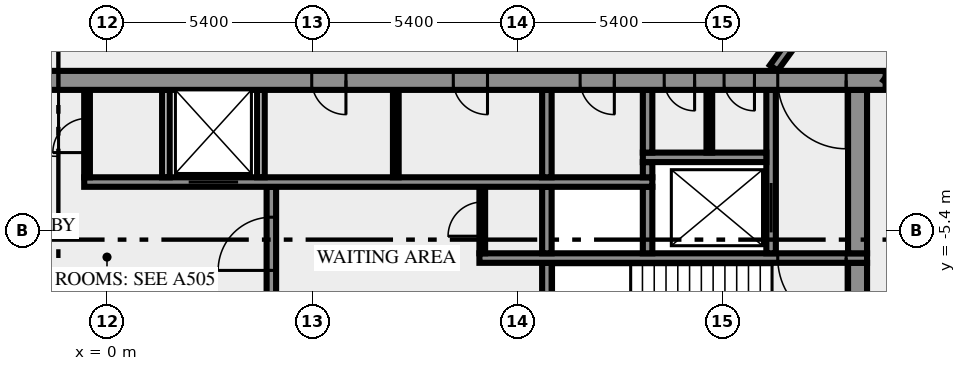
"""IFC4 building model, lengths in metres.
Left out: names, types, materials, properties, quantities, classifications, styles, units other than length and angle.
Written with IfcOpenShell. Run it as: python <this file> out.ifc"""

import sys

from ifc_helpers import new_model, si_unit, direction, frame, frame_2d, origin, place, context, subcontext, project, spatial, rectangle, extrude, element, fill, save


model = new_model("IFC4")
c1 = context("Model", 3, precision=1e-05, world=origin(), true_north=direction((0.0, 1.0)))
c2 = subcontext(c1, "Body", "Model", "MODEL_VIEW")
j1 = project(units=[si_unit("LENGTHUNIT", "METRE"), si_unit("PLANEANGLEUNIT", "RADIAN")], contexts=[c1])
p1 = place(None, origin())
s1 = spatial("IfcSite", under=j1, at=p1, CompositionType="ELEMENT")
p2 = place(p1, origin())
s2 = spatial("IfcBuilding", under=s1, at=p2, CompositionType="ELEMENT")
p3 = place(p2, frame((0.0, 0.0, 253.0)))
s3 = spatial("IfcBuildingStorey", under=s2, at=p3, CompositionType="ELEMENT", Elevation=253.0)
p4 = place(p3, frame((19.75, -10.5, 0.0), z_axis=(0.0, 0.0, 1.0), x_axis=(0.0, 1.0, 0.0)))
e1 = element("IfcWall", 1, at=p4, inside=s3, PredefinedType="SHEAR", context=c2, shape_type="SweptSolid", body=[
    extrude(rectangle(XDim=4.25, YDim=0.5, at=frame_2d((2.125, 0.0))), origin(), (0.0, 0.0, 1.0), 3.65),
])
p5 = place(p3, frame((4.325, -7.25, 0.0), z_axis=(0.0, 0.0, 1.0), x_axis=(0.0, 1.0, 0.0)))
e2 = element("IfcWall", 2, at=p5, inside=s3, PredefinedType="SHEAR", context=c2, shape_type="SweptSolid", body=[
    extrude(rectangle(XDim=3.0, YDim=0.25, at=frame_2d((1.5, 0.0))), origin(), (0.0, 0.0, 1.0), 3.65),
])
p6 = place(p5, frame((0.8, 0.0, 0.0)))
e3 = element("IfcOpeningElement", 3, at=p6, cuts=e2, PredefinedType="OPENING", context=c2, shape_type="SweptSolid", body=[
    extrude(rectangle(XDim=1.4, YDim=2.1, at=frame_2d((0.7, 1.05))), frame((0.0, 0.135, 0.0), z_axis=(0.0, -1.0, 0.0), x_axis=(1.0, 0.0, 0.0)), (0.0, 0.0, 1.0), 0.27),
])
p7 = place(p3, frame((11.575, -7.25, 0.0), z_axis=(0.0, 0.0, 1.0), x_axis=(0.0, 1.0, 0.0)))
e4 = element("IfcWall", 4, at=p7, inside=s3, PredefinedType="SHEAR", context=c2, shape_type="SweptSolid", body=[
    extrude(rectangle(XDim=1.0, YDim=0.25, at=frame_2d((0.5, 0.0))), origin(), (0.0, 0.0, 1.0), 3.65),
])
p8 = place(p3, frame((20.0, -6.125, 0.0), z_axis=(0.0, 0.0, 1.0), x_axis=(-1.0, 0.0, 0.0)))
e5 = element("IfcWall", 5, at=p8, inside=s3, PredefinedType="SHEAR", context=c2, shape_type="SweptSolid", body=[
    extrude(rectangle(XDim=10.2, YDim=0.25, at=frame_2d((5.1, 0.0))), origin(), (0.0, 0.0, 1.0), 3.65),
])
p9 = place(p8, frame((0.55, 0.0, 0.0)))
e6 = element("IfcOpeningElement", 6, at=p9, cuts=e5, PredefinedType="OPENING", context=c2, shape_type="SweptSolid", body=[
    extrude(rectangle(XDim=1.8, YDim=2.1, at=frame_2d((0.9, 1.05))), frame((0.0, 0.135, 0.0), z_axis=(0.0, -1.0, 0.0), x_axis=(1.0, 0.0, 0.0)), (0.0, 0.0, 1.0), 0.27),
])
p10 = place(p3, frame((9.875, -6.0, 0.0), z_axis=(0.0, 0.0, 1.0), x_axis=(0.0, 1.0, 0.0)))
e7 = element("IfcWall", 7, at=p10, inside=s3, PredefinedType="PARTITIONING", context=c2, shape_type="SweptSolid", body=[
    extrude(rectangle(XDim=1.75, YDim=0.15, at=frame_2d((0.875, 0.0))), origin(), (0.0, 0.0, 1.0), 3.65),
])
p11 = place(p10, frame((0.45, 0.0, 0.0)))
e8 = element("IfcOpeningElement", 8, at=p11, cuts=e7, PredefinedType="OPENING", context=c2, shape_type="SweptSolid", body=[
    extrude(rectangle(XDim=0.9, YDim=2.1, at=frame_2d((0.45, 1.05))), frame((0.0, 0.085, 0.0), z_axis=(0.0, -1.0, 0.0), x_axis=(1.0, 0.0, 0.0)), (0.0, 0.0, 1.0), 0.17),
])
for number, where, z_axis, x_axis in (
    (9, (11.575, -6.0, 0.0), (0.0, 0.0, 1.0), (0.0, 1.0, 0.0)),
    (10, (14.225, -6.0, 0.0), (0.0, 0.0, 1.0), (0.0, 1.0, 0.0)),
):
    element("IfcWall", number, at=place(p3, frame(where, z_axis=z_axis, x_axis=x_axis)), inside=s3, PredefinedType="SHEAR", context=c2, shape_type="SweptSolid", body=[
        extrude(rectangle(XDim=1.75, YDim=0.25, at=frame_2d((0.875, 0.0))), origin(), (0.0, 0.0, 1.0), 3.65),
    ])
p12 = place(p3, frame((17.475, -6.0, 0.0), z_axis=(0.0, 0.0, 1.0), x_axis=(0.0, 1.0, 0.0)))
e11 = element("IfcWall", 11, at=p12, inside=s3, PredefinedType="SHEAR", context=c2, shape_type="SweptSolid", body=[
    extrude(rectangle(XDim=4.3, YDim=0.25, at=frame_2d((2.15, 0.0))), origin(), (0.0, 0.0, 1.0), 3.65),
])
p13 = place(p12, frame((0.55, 0.0, 0.0)))
e12 = element("IfcOpeningElement", 12, at=p13, cuts=e11, PredefinedType="OPENING", context=c2, shape_type="SweptSolid", body=[
    extrude(rectangle(XDim=1.3, YDim=2.1, at=frame_2d((0.65, 1.05))), frame((0.0, 0.135, 0.0), z_axis=(0.0, -1.0, 0.0), x_axis=(1.0, 0.0, 0.0)), (0.0, 0.0, 1.0), 0.27),
])
p14 = place(p3, frame((19.75, -6.0, 0.0), z_axis=(0.0, 0.0, 1.0), x_axis=(0.0, 1.0, 0.0)))
e13 = element("IfcWall", 13, at=p14, inside=s3, PredefinedType="SHEAR", context=c2, shape_type="SweptSolid", body=[
    extrude(rectangle(XDim=4.3, YDim=0.5, at=frame_2d((2.15, 0.0))), origin(), (0.0, 0.0, 1.0), 3.65),
])
p15 = place(p3, frame((-0.6, -4.125, 0.0), z_axis=(0.0, 0.0, 1.0), x_axis=(1.0, 0.0, 0.0)))
e14 = element("IfcWall", 14, at=p15, inside=s3, PredefinedType="SHEAR", context=c2, shape_type="SweptSolid", body=[
    extrude(rectangle(XDim=14.95, YDim=0.25, at=frame_2d((7.475, 0.0))), origin(), (0.0, 0.0, 1.0), 3.65),
])
p16 = place(p15, frame((2.75, 0.0, 0.0)))
e15 = element("IfcOpeningElement", 15, at=p16, cuts=e14, PredefinedType="OPENING", context=c2, shape_type="SweptSolid", body=[
    extrude(rectangle(XDim=1.3, YDim=2.1, at=frame_2d((0.65, 1.05))), frame((0.0, 0.135, 0.0), z_axis=(0.0, -1.0, 0.0), x_axis=(1.0, 0.0, 0.0)), (0.0, 0.0, 1.0), 0.27),
])
p17 = place(p3, frame((-0.525, -4.0, 0.0), z_axis=(0.0, 0.0, 1.0), x_axis=(0.0, 1.0, 0.0)))
e16 = element("IfcWall", 16, at=p17, inside=s3, PredefinedType="PARTITIONING", context=c2, shape_type="SweptSolid", body=[
    extrude(rectangle(XDim=2.3, YDim=0.15, at=frame_2d((1.15, 0.0))), origin(), (0.0, 0.0, 1.0), 3.65),
])
p18 = place(p17, frame((0.65, 0.0, 0.0)))
e17 = element("IfcOpeningElement", 17, at=p18, cuts=e16, PredefinedType="OPENING", context=c2, shape_type="SweptSolid", body=[
    extrude(rectangle(XDim=0.9, YDim=2.1, at=frame_2d((0.45, 1.05))), frame((0.0, 0.085, 0.0), z_axis=(0.0, -1.0, 0.0), x_axis=(1.0, 0.0, 0.0)), (0.0, 0.0, 1.0), 0.17),
])
for number, where, z_axis, x_axis in (
    (18, (1.55, -4.0, 0.0), (0.0, 0.0, 1.0), (0.0, 1.0, 0.0)),
    (19, (4.05, -4.0, 0.0), (0.0, 0.0, 1.0), (0.0, 1.0, 0.0)),
):
    element("IfcWall", number, at=place(p3, frame(where, z_axis=z_axis, x_axis=x_axis)), inside=s3, PredefinedType="SOLIDWALL", context=c2, shape_type="SweptSolid", body=[
        extrude(rectangle(XDim=2.3, YDim=0.2, at=frame_2d((1.15, 0.0))), origin(), (0.0, 0.0, 1.0), 3.65),
    ])
p19 = place(p3, frame((7.6, -4.0, 0.0), z_axis=(0.0, 0.0, 1.0), x_axis=(0.0, 1.0, 0.0)))
e20 = element("IfcWall", 20, at=p19, inside=s3, PredefinedType="PARTITIONING", context=c2, shape_type="SweptSolid", body=[
    extrude(rectangle(XDim=2.3, YDim=0.15, at=frame_2d((1.15, 0.0))), origin(), (0.0, 0.0, 1.0), 3.65),
])
p20 = place(p3, frame((11.575, -4.0, 0.0), z_axis=(0.0, 0.0, 1.0), x_axis=(0.0, 1.0, 0.0)))
e21 = element("IfcWall", 21, at=p20, inside=s3, PredefinedType="SHEAR", context=c2, shape_type="SweptSolid", body=[
    extrude(rectangle(XDim=2.3, YDim=0.25, at=frame_2d((1.15, 0.0))), origin(), (0.0, 0.0, 1.0), 3.65),
])
p21 = place(p3, frame((14.225, -4.0, 0.0), z_axis=(0.0, 0.0, 1.0), x_axis=(0.0, 1.0, 0.0)))
e22 = element("IfcWall", 22, at=p21, inside=s3, PredefinedType="SHEAR", context=c2, shape_type="SweptSolid", body=[
    extrude(rectangle(XDim=0.4, YDim=0.25, at=frame_2d((0.2, 0.0))), origin(), (0.0, 0.0, 1.0), 3.65),
])
p22 = place(p3, frame((14.1, -3.475, 0.0), z_axis=(0.0, 0.0, 1.0), x_axis=(1.0, 0.0, 0.0)))
e23 = element("IfcWall", 23, at=p22, inside=s3, PredefinedType="SHEAR", context=c2, shape_type="SweptSolid", body=[
    extrude(rectangle(XDim=3.25, YDim=0.25, at=frame_2d((1.625, 0.0))), origin(), (0.0, 0.0, 1.0), 3.65),
])
p23 = place(p3, frame((14.225, -3.35, 0.0), z_axis=(0.0, 0.0, 1.0), x_axis=(0.0, 1.0, 0.0)))
e24 = element("IfcWall", 24, at=p23, inside=s3, PredefinedType="SHEAR", context=c2, shape_type="SweptSolid", body=[
    extrude(rectangle(XDim=1.65, YDim=0.25, at=frame_2d((0.825, 0.0))), origin(), (0.0, 0.0, 1.0), 3.65),
])
p24 = place(p3, frame((15.85, -3.35, 0.0), z_axis=(0.0, 0.0, 1.0), x_axis=(0.0, 1.0, 0.0)))
e25 = element("IfcWall", 25, at=p24, inside=s3, PredefinedType="PARTITIONING", context=c2, shape_type="SweptSolid", body=[
    extrude(rectangle(XDim=1.65, YDim=0.15, at=frame_2d((0.825, 0.0))), origin(), (0.0, 0.0, 1.0), 3.65),
])
p25 = place(p3, frame((20.49, -1.45, 0.0), z_axis=(0.0, 0.0, 1.0), x_axis=(-1.0, 0.0, 0.0)))
e26 = element("IfcWall", 26, at=p25, inside=s3, PredefinedType="SHEAR", context=c2, shape_type="SweptSolid", body=[
    extrude(rectangle(XDim=40.98, YDim=0.5, at=frame_2d((20.49, 0.0))), origin(), (0.0, 0.0, 1.0), 3.65),
])
p26 = place(p25, frame((38.14, 0.0, 0.0)))
e27 = element("IfcOpeningElement", 27, at=p26, cuts=e26, PredefinedType="OPENING", context=c2, shape_type="SweptSolid", body=[
    extrude(rectangle(XDim=1.8, YDim=2.1, at=frame_2d((0.9, 1.05))), frame((0.0, 0.26, 0.0), z_axis=(0.0, -1.0, 0.0), x_axis=(1.0, 0.0, 0.0)), (0.0, 0.0, 1.0), 0.52),
])
p27 = place(p25, frame((35.89, 0.0, 0.0)))
e28 = element("IfcOpeningElement", 28, at=p27, cuts=e26, PredefinedType="OPENING", context=c2, shape_type="SweptSolid", body=[
    extrude(rectangle(XDim=0.9, YDim=2.1, at=frame_2d((0.45, 1.05))), frame((0.0, 0.26, 0.0), z_axis=(0.0, -1.0, 0.0), x_axis=(1.0, 0.0, 0.0)), (0.0, 0.0, 1.0), 0.52),
])
p28 = place(p25, frame((32.94, 0.0, 0.0)))
e29 = element("IfcOpeningElement", 29, at=p28, cuts=e26, PredefinedType="OPENING", context=c2, shape_type="SweptSolid", body=[
    extrude(rectangle(XDim=0.9, YDim=2.1, at=frame_2d((0.45, 1.05))), frame((0.0, 0.26, 0.0), z_axis=(0.0, -1.0, 0.0), x_axis=(1.0, 0.0, 0.0)), (0.0, 0.0, 1.0), 0.52),
])
p29 = place(p25, frame((31.015, 0.0, 0.0)))
e30 = element("IfcOpeningElement", 30, at=p29, cuts=e26, PredefinedType="OPENING", context=c2, shape_type="SweptSolid", body=[
    extrude(rectangle(XDim=0.8, YDim=2.1, at=frame_2d((0.4, 1.05))), frame((0.0, 0.26, 0.0), z_axis=(0.0, -1.0, 0.0), x_axis=(1.0, 0.0, 0.0)), (0.0, 0.0, 1.0), 0.52),
])
p30 = place(p25, frame((24.765, 0.0, 0.0)))
e31 = element("IfcOpeningElement", 31, at=p30, cuts=e26, PredefinedType="OPENING", context=c2, shape_type="SweptSolid", body=[
    extrude(rectangle(XDim=0.8, YDim=2.1, at=frame_2d((0.4, 1.05))), frame((0.0, 0.26, 0.0), z_axis=(0.0, -1.0, 0.0), x_axis=(1.0, 0.0, 0.0)), (0.0, 0.0, 1.0), 0.52),
])
p31 = place(p25, frame((21.765, 0.0, 0.0)))
e32 = element("IfcOpeningElement", 32, at=p31, cuts=e26, PredefinedType="OPENING", context=c2, shape_type="SweptSolid", body=[
    extrude(rectangle(XDim=2.0, YDim=2.1, at=frame_2d((1.0, 1.05))), frame((0.0, 0.26, 0.0), z_axis=(0.0, -1.0, 0.0), x_axis=(1.0, 0.0, 0.0)), (0.0, 0.0, 1.0), 0.52),
])
p32 = place(p25, frame((14.202, 0.0, 0.0)))
e33 = element("IfcOpeningElement", 33, at=p32, cuts=e26, PredefinedType="OPENING", context=c2, shape_type="SweptSolid", body=[
    extrude(rectangle(XDim=0.9, YDim=2.1, at=frame_2d((0.45, 1.05))), frame((0.0, 0.26, 0.0), z_axis=(0.0, -1.0, 0.0), x_axis=(1.0, 0.0, 0.0)), (0.0, 0.0, 1.0), 0.52),
])
p33 = place(p25, frame((10.478, 0.0, 0.0)))
e34 = element("IfcOpeningElement", 34, at=p33, cuts=e26, PredefinedType="OPENING", context=c2, shape_type="SweptSolid", body=[
    extrude(rectangle(XDim=0.9, YDim=2.1, at=frame_2d((0.45, 1.05))), frame((0.0, 0.26, 0.0), z_axis=(0.0, -1.0, 0.0), x_axis=(1.0, 0.0, 0.0)), (0.0, 0.0, 1.0), 0.52),
])
p34 = place(p25, frame((7.14, 0.0, 0.0)))
e35 = element("IfcOpeningElement", 35, at=p34, cuts=e26, PredefinedType="OPENING", context=c2, shape_type="SweptSolid", body=[
    extrude(rectangle(XDim=0.9, YDim=2.1, at=frame_2d((0.45, 1.05))), frame((0.0, 0.26, 0.0), z_axis=(0.0, -1.0, 0.0), x_axis=(1.0, 0.0, 0.0)), (0.0, 0.0, 1.0), 0.52),
])
p35 = place(p25, frame((5.028, 0.0, 0.0)))
e36 = element("IfcOpeningElement", 36, at=p35, cuts=e26, PredefinedType="OPENING", context=c2, shape_type="SweptSolid", body=[
    extrude(rectangle(XDim=0.8, YDim=2.1, at=frame_2d((0.4, 1.05))), frame((0.0, 0.26, 0.0), z_axis=(0.0, -1.0, 0.0), x_axis=(1.0, 0.0, 0.0)), (0.0, 0.0, 1.0), 0.52),
])
p36 = place(p25, frame((3.452, 0.0, 0.0)))
e37 = element("IfcOpeningElement", 37, at=p36, cuts=e26, PredefinedType="OPENING", context=c2, shape_type="SweptSolid", body=[
    extrude(rectangle(XDim=0.8, YDim=2.1, at=frame_2d((0.4, 1.05))), frame((0.0, 0.26, 0.0), z_axis=(0.0, -1.0, 0.0), x_axis=(1.0, 0.0, 0.0)), (0.0, 0.0, 1.0), 0.52),
])
p37 = place(p25, frame((1.04, 0.0, 0.0)))
e38 = element("IfcOpeningElement", 38, at=p37, cuts=e26, PredefinedType="OPENING", context=c2, shape_type="SweptSolid", body=[
    extrude(rectangle(XDim=1.8, YDim=2.1, at=frame_2d((0.9, 1.05))), frame((0.0, 0.26, 0.0), z_axis=(0.0, -1.0, 0.0), x_axis=(1.0, 0.0, 0.0)), (0.0, 0.0, 1.0), 0.52),
])
p38 = place(p3, frame((17.545, -1.125, 0.0), z_axis=(0.0, 0.0, 1.0), x_axis=(0.587796810203, 0.809008596935, 0.0)))
e39 = element("IfcWall", 39, at=p38, inside=s3, PredefinedType="SOLIDWALL", context=c2, shape_type="SweptSolid", body=[
    extrude(rectangle(XDim=12.703, YDim=0.25, at=frame_2d((6.352, 0.0))), origin(), (0.0, 0.0, 1.0), 3.65),
])
p39 = place(p38, frame((3.441, 0.0, 0.0)))
e40 = element("IfcOpeningElement", 40, at=p39, cuts=e39, PredefinedType="OPENING", context=c2, shape_type="SweptSolid", body=[
    extrude(rectangle(XDim=0.9, YDim=2.1, at=frame_2d((0.45, 1.05))), frame((0.0, 0.135, 0.0), z_axis=(0.0, -1.0, 0.0), x_axis=(1.0, 0.0, 0.0)), (0.0, 0.0, 1.0), 0.27),
])
p40 = place(p3, frame((27.009, 7.392, 0.0), z_axis=(0.0, 0.0, 1.0), x_axis=(-0.587776457057, -0.809023384414, 0.0)))
e41 = element("IfcWall", 41, at=p40, inside=s3, PredefinedType="SOLIDWALL", context=c2, shape_type="SweptSolid", body=[
    extrude(rectangle(XDim=11.021, YDim=0.25, at=frame_2d((5.51, 0.0))), origin(), (0.0, 0.0, 1.0), 3.65),
])
p41 = place(p40, frame((0.225, 0.0, 0.0)))
e42 = element("IfcOpeningElement", 42, at=p41, cuts=e41, PredefinedType="OPENING", context=c2, shape_type="SweptSolid", body=[
    extrude(rectangle(XDim=0.9, YDim=2.1, at=frame_2d((0.45, 1.05))), frame((0.0, 0.135, 0.0), z_axis=(0.0, -1.0, 0.0), x_axis=(1.0, 0.0, 0.0)), (0.0, 0.0, 1.0), 0.27),
])
p42 = place(p6, origin())
e43 = element("IfcDoor", 43, at=p42, inside=s3, OperationType="DOUBLE_DOOR_SINGLE_SWING", PredefinedType="DOOR", context=c2, shape_type="SweptSolid", body=[
    extrude(rectangle(XDim=1.4, YDim=2.1, at=frame_2d((0.7, 1.05))), frame((0.0, 0.025, 0.0), z_axis=(0.0, -1.0, 0.0), x_axis=(1.0, 0.0, 0.0)), (0.0, 0.0, 1.0), 0.05),
])
fill(e3, e43)
p43 = place(p9, origin())
e44 = element("IfcDoor", 44, at=p43, inside=s3, OperationType="DOUBLE_DOOR_SINGLE_SWING", PredefinedType="DOOR", context=c2, shape_type="SweptSolid", body=[
    extrude(rectangle(XDim=1.8, YDim=2.1, at=frame_2d((0.9, 1.05))), frame((0.0, 0.025, 0.0), z_axis=(0.0, -1.0, 0.0), x_axis=(1.0, 0.0, 0.0)), (0.0, 0.0, 1.0), 0.05),
])
fill(e6, e44)
p44 = place(p11, origin())
e45 = element("IfcDoor", 45, at=p44, inside=s3, OperationType="SINGLE_SWING_RIGHT", PredefinedType="DOOR", context=c2, shape_type="SweptSolid", body=[
    extrude(rectangle(XDim=0.9, YDim=2.1, at=frame_2d((0.45, 1.05))), frame((0.0, 0.025, 0.0), z_axis=(0.0, -1.0, 0.0), x_axis=(1.0, 0.0, 0.0)), (0.0, 0.0, 1.0), 0.05),
])
fill(e8, e45)
p45 = place(p13, origin())
e46 = element("IfcDoor", 46, at=p45, inside=s3, OperationType="DOUBLE_DOOR_SLIDING", PredefinedType="DOOR", context=c2, shape_type="SweptSolid", body=[
    extrude(rectangle(XDim=1.3, YDim=2.1, at=frame_2d((0.65, 1.05))), frame((0.0, 0.025, 0.0), z_axis=(0.0, -1.0, 0.0), x_axis=(1.0, 0.0, 0.0)), (0.0, 0.0, 1.0), 0.05),
])
fill(e12, e46)
p46 = place(p16, origin())
e47 = element("IfcDoor", 47, at=p46, inside=s3, OperationType="DOUBLE_DOOR_SLIDING", PredefinedType="DOOR", context=c2, shape_type="SweptSolid", body=[
    extrude(rectangle(XDim=1.3, YDim=2.1, at=frame_2d((0.65, 1.05))), frame((0.0, 0.025, 0.0), z_axis=(0.0, -1.0, 0.0), x_axis=(1.0, 0.0, 0.0)), (0.0, 0.0, 1.0), 0.05),
])
fill(e15, e47)
p47 = place(p18, origin())
e48 = element("IfcDoor", 48, at=p47, inside=s3, OperationType="SINGLE_SWING_LEFT", PredefinedType="DOOR", context=c2, shape_type="SweptSolid", body=[
    extrude(rectangle(XDim=0.9, YDim=2.1, at=frame_2d((0.45, 1.05))), frame((0.0, 0.025, 0.0), z_axis=(0.0, -1.0, 0.0), x_axis=(1.0, 0.0, 0.0)), (0.0, 0.0, 1.0), 0.05),
])
fill(e17, e48)
p48 = place(p31, origin())
e49 = element("IfcDoor", 49, at=p48, inside=s3, OperationType="DOUBLE_DOOR_SINGLE_SWING", PredefinedType="DOOR", context=c2, shape_type="SweptSolid", body=[
    extrude(rectangle(XDim=2.0, YDim=2.1, at=frame_2d((1.0, 1.05))), frame((0.0, 0.025, 0.0), z_axis=(0.0, -1.0, 0.0), x_axis=(1.0, 0.0, 0.0)), (0.0, 0.0, 1.0), 0.05),
])
fill(e32, e49)
p49 = place(p32, origin())
e50 = element("IfcDoor", 50, at=p49, inside=s3, OperationType="SINGLE_SWING_LEFT", PredefinedType="DOOR", context=c2, shape_type="SweptSolid", body=[
    extrude(rectangle(XDim=0.9, YDim=2.1, at=frame_2d((0.45, 1.05))), frame((0.0, 0.025, 0.0), z_axis=(0.0, -1.0, 0.0), x_axis=(1.0, 0.0, 0.0)), (0.0, 0.0, 1.0), 0.05),
])
fill(e33, e50)
p50 = place(p33, origin())
e51 = element("IfcDoor", 51, at=p50, inside=s3, OperationType="SINGLE_SWING_LEFT", PredefinedType="DOOR", context=c2, shape_type="SweptSolid", body=[
    extrude(rectangle(XDim=0.9, YDim=2.1, at=frame_2d((0.45, 1.05))), frame((0.0, 0.025, 0.0), z_axis=(0.0, -1.0, 0.0), x_axis=(1.0, 0.0, 0.0)), (0.0, 0.0, 1.0), 0.05),
])
fill(e34, e51)
p51 = place(p34, origin())
e52 = element("IfcDoor", 52, at=p51, inside=s3, OperationType="SINGLE_SWING_LEFT", PredefinedType="DOOR", context=c2, shape_type="SweptSolid", body=[
    extrude(rectangle(XDim=0.9, YDim=2.1, at=frame_2d((0.45, 1.05))), frame((0.0, 0.025, 0.0), z_axis=(0.0, -1.0, 0.0), x_axis=(1.0, 0.0, 0.0)), (0.0, 0.0, 1.0), 0.05),
])
fill(e35, e52)
p52 = place(p35, origin())
e53 = element("IfcDoor", 53, at=p52, inside=s3, OperationType="SINGLE_SWING_LEFT", PredefinedType="DOOR", context=c2, shape_type="SweptSolid", body=[
    extrude(rectangle(XDim=0.8, YDim=2.1, at=frame_2d((0.4, 1.05))), frame((0.0, 0.025, 0.0), z_axis=(0.0, -1.0, 0.0), x_axis=(1.0, 0.0, 0.0)), (0.0, 0.0, 1.0), 0.05),
])
fill(e36, e53)
p53 = place(p36, origin())
e54 = element("IfcDoor", 54, at=p53, inside=s3, OperationType="SINGLE_SWING_LEFT", PredefinedType="DOOR", context=c2, shape_type="SweptSolid", body=[
    extrude(rectangle(XDim=0.8, YDim=2.1, at=frame_2d((0.4, 1.05))), frame((0.0, 0.025, 0.0), z_axis=(0.0, -1.0, 0.0), x_axis=(1.0, 0.0, 0.0)), (0.0, 0.0, 1.0), 0.05),
])
fill(e37, e54)
p54 = place(p37, origin())
e55 = element("IfcDoor", 55, at=p54, inside=s3, OperationType="DOUBLE_DOOR_SINGLE_SWING", PredefinedType="DOOR", context=c2, shape_type="SweptSolid", body=[
    extrude(rectangle(XDim=1.8, YDim=2.1, at=frame_2d((0.9, 1.05))), frame((0.0, 0.025, 0.0), z_axis=(0.0, -1.0, 0.0), x_axis=(1.0, 0.0, 0.0)), (0.0, 0.0, 1.0), 0.05),
])
fill(e38, e55)
save(model, sys.argv[1])
